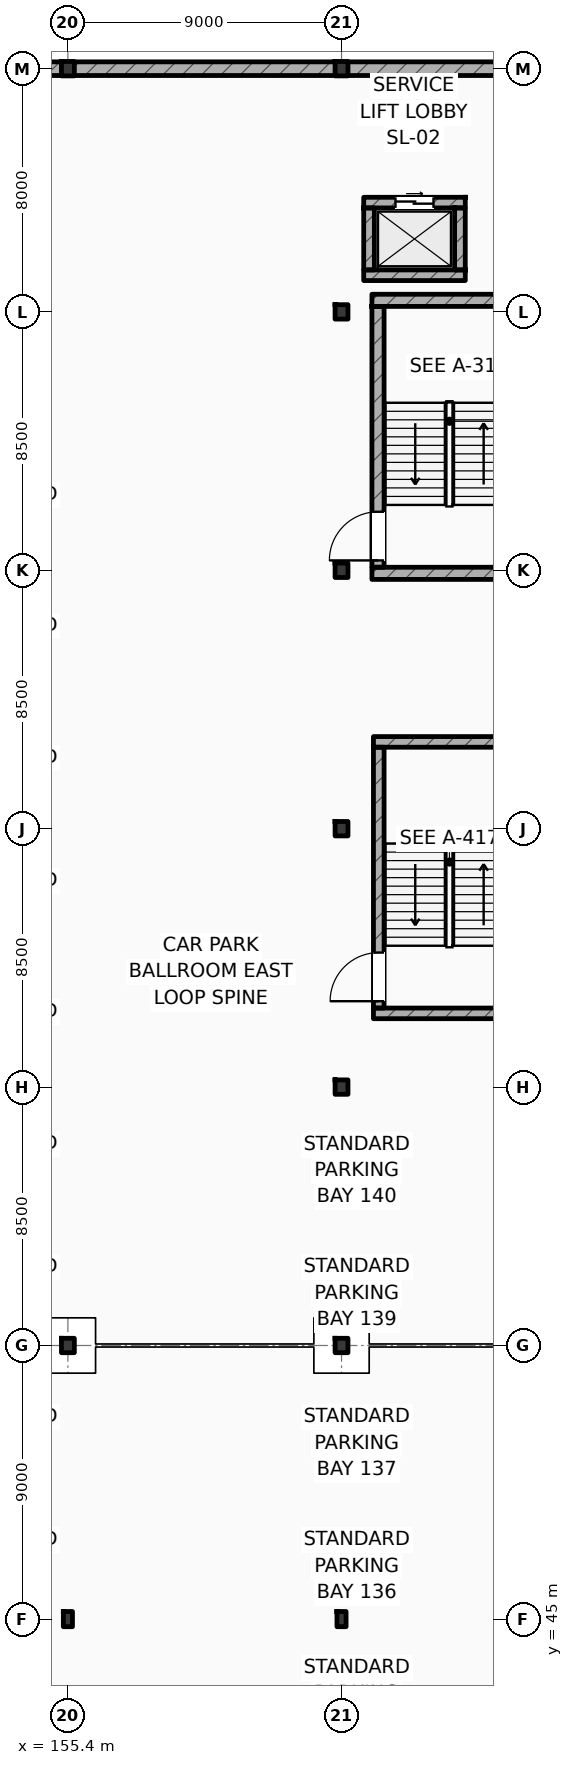
"""IFC4 building model, lengths in metres.
Left out: names, types, materials, properties, quantities, classifications, styles, units other than length and angle.
Written with IfcOpenShell. Run it as: python <this file> out.ifc"""

import sys

from ifc_helpers import new_model, si_unit, direction, frame, frame_2d, origin, origin_2d, place, context, subcontext, project, spatial, rectangle, i_section, extrude, element, fill, save


model = new_model("IFC4")
c1 = context("Model", 3, precision=1e-05, world=origin(), true_north=direction((0.0, 1.0)))
c2 = subcontext(c1, "Body", "Model", "MODEL_VIEW")
j1 = project(units=[si_unit("LENGTHUNIT", "METRE"), si_unit("PLANEANGLEUNIT", "RADIAN")], contexts=[c1])
p1 = place(None, origin())
s1 = spatial("IfcSite", under=j1, at=p1, CompositionType="ELEMENT")
p2 = place(p1, origin())
s2 = spatial("IfcBuilding", under=s1, at=p2, CompositionType="ELEMENT")
p3 = place(p2, frame((0.0, 0.0, -4.5)))
s3 = spatial("IfcBuildingStorey", under=s2, at=p3, CompositionType="ELEMENT", Elevation=-4.5)
p4 = place(p3, frame((172.0, 96.0, 0.0), z_axis=(0.0, 0.0, 1.0), x_axis=(-1.0, 0.0, 0.0)))
e1 = element("IfcWall", 1, at=p4, inside=s3, PredefinedType="SOLIDWALL", context=c2, shape_type="SweptSolid", body=[
    extrude(rectangle(XDim=52.0, YDim=0.45, at=frame_2d((26.0, 0.0))), origin(), (0.0, 0.0, 1.0), 4.5),
])
for number, where, z_axis, x_axis in (
    (2, (164.4, 54.0, 0.0), (0.0, 0.0, 1.0), (1.0, 0.0, 0.0)),
    (3, (164.4, 62.5, 0.0), (0.0, 0.0, 1.0), (1.0, 0.0, 0.0)),
    (4, (164.4, 71.0, 0.0), (0.0, 0.0, 1.0), (1.0, 0.0, 0.0)),
    (5, (164.4, 79.5, 0.0), (0.0, 0.0, 1.0), (1.0, 0.0, 0.0)),
    (6, (164.4, 88.0, 0.0), (0.0, 0.0, 1.0), (1.0, 0.0, 0.0)),
    (7, (164.4, 96.0, 0.0), (0.0, 0.0, 1.0), (1.0, 0.0, 0.0)),
    (8, (155.4, 54.0, 0.0), (0.0, 0.0, 1.0), (1.0, 0.0, 0.0)),
    (9, (155.4, 96.0, 0.0), (0.0, 0.0, 1.0), (1.0, 0.0, 0.0)),
):
    element("IfcColumn", number, at=place(p3, frame(where, z_axis=z_axis, x_axis=x_axis)), inside=s3, PredefinedType="COLUMN", context=c2, shape_type="SweptSolid", body=[
        extrude(i_section(OverallWidth=0.424, OverallDepth=0.474, WebThickness=0.045, FlangeThickness=0.055, FilletRadius=0.015, at=origin_2d()), origin(), (0.0, 0.0, 1.0), 4.5),
    ])
for number, where, z_axis, x_axis in (
    (10, (155.4, 45.0, 0.0), (0.0, 0.0, 1.0), (1.0, 0.0, 0.0)),
    (11, (164.4, 45.0, 0.0), (0.0, 0.0, 1.0), (1.0, 0.0, 0.0)),
):
    element("IfcColumn", number, at=place(p3, frame(where, z_axis=z_axis, x_axis=x_axis)), inside=s3, PredefinedType="COLUMN", context=c2, shape_type="SweptSolid", body=[
        extrude(i_section(OverallWidth=0.3, OverallDepth=0.5, WebThickness=0.014, FlangeThickness=0.028, FilletRadius=0.027, at=origin_2d()), origin(), (0.0, 0.0, 1.0), 4.5),
    ])
for number, where, z_axis, x_axis in (
    (12, (165.4, 88.38, 0.0), (0.0, 0.0, 1.0), (1.0, 0.0, 0.0)),
    (13, (165.4, 79.4, 0.0), (0.0, 0.0, 1.0), (1.0, 0.0, 0.0)),
):
    element("IfcWall", number, at=place(p3, frame(where, z_axis=z_axis, x_axis=x_axis)), inside=s3, PredefinedType="SHEAR", context=c2, shape_type="SweptSolid", body=[
        extrude(rectangle(XDim=5.1, YDim=0.4, at=frame_2d((2.55, 0.0))), origin(), (0.0, 0.0, 1.0), 4.5),
    ])
p5 = place(p3, frame((165.6, 79.6, 0.0), z_axis=(0.0, 0.0, 1.0), x_axis=(0.0, 1.0, 0.0)))
e14 = element("IfcWall", 14, at=p5, inside=s3, PredefinedType="SHEAR", context=c2, shape_type="SweptSolid", body=[
    extrude(rectangle(XDim=8.58, YDim=0.4, at=frame_2d((4.29, 0.0))), origin(), (0.0, 0.0, 1.0), 4.5),
])
p6 = place(p5, frame((0.225, 0.0, 0.0)))
e15 = element("IfcOpeningElement", 15, at=p6, cuts=e14, PredefinedType="OPENING", context=c2, shape_type="SweptSolid", body=[
    extrude(rectangle(XDim=1.6, YDim=2.2, at=frame_2d((0.8, 1.1))), frame((0.0, 0.21, 0.0), z_axis=(0.0, -1.0, 0.0), x_axis=(1.0, 0.0, 0.0)), (0.0, 0.0, 1.0), 0.42),
])
for number, where, z_axis, x_axis in (
    (16, (165.45, 73.855, 0.0), (0.0, 0.0, 1.0), (1.0, 0.0, 0.0)),
    (17, (165.45, 64.925, 0.0), (0.0, 0.0, 1.0), (1.0, 0.0, 0.0)),
):
    element("IfcWall", number, at=place(p3, frame(where, z_axis=z_axis, x_axis=x_axis)), inside=s3, PredefinedType="SHEAR", context=c2, shape_type="SweptSolid", body=[
        extrude(rectangle(XDim=5.0, YDim=0.35, at=frame_2d((2.5, 0.0))), origin(), (0.0, 0.0, 1.0), 4.5),
    ])
p7 = place(p3, frame((165.625, 65.1, 0.0), z_axis=(0.0, 0.0, 1.0), x_axis=(0.0, 1.0, 0.0)))
e18 = element("IfcWall", 18, at=p7, inside=s3, PredefinedType="SHEAR", context=c2, shape_type="SweptSolid", body=[
    extrude(rectangle(XDim=8.58, YDim=0.35, at=frame_2d((4.29, 0.0))), origin(), (0.0, 0.0, 1.0), 4.5),
])
p8 = place(p7, frame((0.225, 0.0, 0.0)))
e19 = element("IfcOpeningElement", 19, at=p8, cuts=e18, PredefinedType="OPENING", context=c2, shape_type="SweptSolid", body=[
    extrude(rectangle(XDim=1.6, YDim=2.2, at=frame_2d((0.8, 1.1))), frame((0.0, 0.185, 0.0), z_axis=(0.0, -1.0, 0.0), x_axis=(1.0, 0.0, 0.0)), (0.0, 0.0, 1.0), 0.37),
])
p9 = place(p3, frame((165.13, 91.595, 0.0), z_axis=(0.0, 0.0, 1.0), x_axis=(1.0, 0.0, 0.0)))
e20 = element("IfcWall", 20, at=p9, inside=s3, PredefinedType="SHEAR", context=c2, shape_type="SweptSolid", body=[
    extrude(rectangle(XDim=3.34, YDim=0.35, at=frame_2d((1.67, 0.0))), origin(), (0.0, 0.0, 1.0), 4.1),
])
p10 = place(p9, frame((1.045, 0.0, 0.0)))
e21 = element("IfcOpeningElement", 21, at=p10, cuts=e20, PredefinedType="OPENING", context=c2, shape_type="SweptSolid", body=[
    extrude(rectangle(XDim=1.25, YDim=2.25, at=frame_2d((0.625, 1.125))), frame((0.0, 0.185, 0.0), z_axis=(0.0, -1.0, 0.0), x_axis=(1.0, 0.0, 0.0)), (0.0, 0.0, 1.0), 0.37),
])
p11 = place(p3, frame((165.13, 89.205, 0.0), z_axis=(0.0, 0.0, 1.0), x_axis=(1.0, 0.0, 0.0)))
e22 = element("IfcWall", 22, at=p11, inside=s3, PredefinedType="SHEAR", context=c2, shape_type="SweptSolid", body=[
    extrude(rectangle(XDim=3.34, YDim=0.35, at=frame_2d((1.67, 0.0))), origin(), (0.0, 0.0, 1.0), 4.1),
])
for number, where, z_axis, x_axis in (
    (23, (165.305, 89.38, 0.0), (0.0, 0.0, 1.0), (0.0, 1.0, 0.0)),
    (24, (168.295, 89.38, 0.0), (0.0, 0.0, 1.0), (0.0, 1.0, 0.0)),
):
    element("IfcWall", number, at=place(p3, frame(where, z_axis=z_axis, x_axis=x_axis)), inside=s3, PredefinedType="SHEAR", context=c2, shape_type="SweptSolid", body=[
        extrude(rectangle(XDim=2.04, YDim=0.35, at=frame_2d((1.02, 0.0))), origin(), (0.0, 0.0, 1.0), 4.1),
    ])
p12 = place(p6, origin())
e25 = element("IfcDoor", 25, at=p12, inside=s3, OperationType="SINGLE_SWING_LEFT", PredefinedType="DOOR", context=c2, shape_type="SweptSolid", body=[
    extrude(rectangle(XDim=1.6, YDim=2.2, at=frame_2d((0.8, 1.1))), frame((0.0, 0.025, 0.0), z_axis=(0.0, -1.0, 0.0), x_axis=(1.0, 0.0, 0.0)), (0.0, 0.0, 1.0), 0.05),
])
fill(e15, e25)
p13 = place(p8, origin())
e26 = element("IfcDoor", 26, at=p13, inside=s3, OperationType="SINGLE_SWING_LEFT", PredefinedType="DOOR", context=c2, shape_type="SweptSolid", body=[
    extrude(rectangle(XDim=1.6, YDim=2.2, at=frame_2d((0.8, 1.1))), frame((0.0, 0.025, 0.0), z_axis=(0.0, -1.0, 0.0), x_axis=(1.0, 0.0, 0.0)), (0.0, 0.0, 1.0), 0.05),
])
fill(e19, e26)
p14 = place(p10, origin())
e27 = element("IfcDoor", 27, at=p14, inside=s3, OperationType="SLIDING_TO_LEFT", PredefinedType="DOOR", context=c2, shape_type="SweptSolid", body=[
    extrude(rectangle(XDim=1.25, YDim=2.25, at=frame_2d((0.625, 1.125))), frame((0.0, 0.025, 0.0), z_axis=(0.0, -1.0, 0.0), x_axis=(1.0, 0.0, 0.0)), (0.0, 0.0, 1.0), 0.05),
])
fill(e21, e27)
save(model, sys.argv[1])
